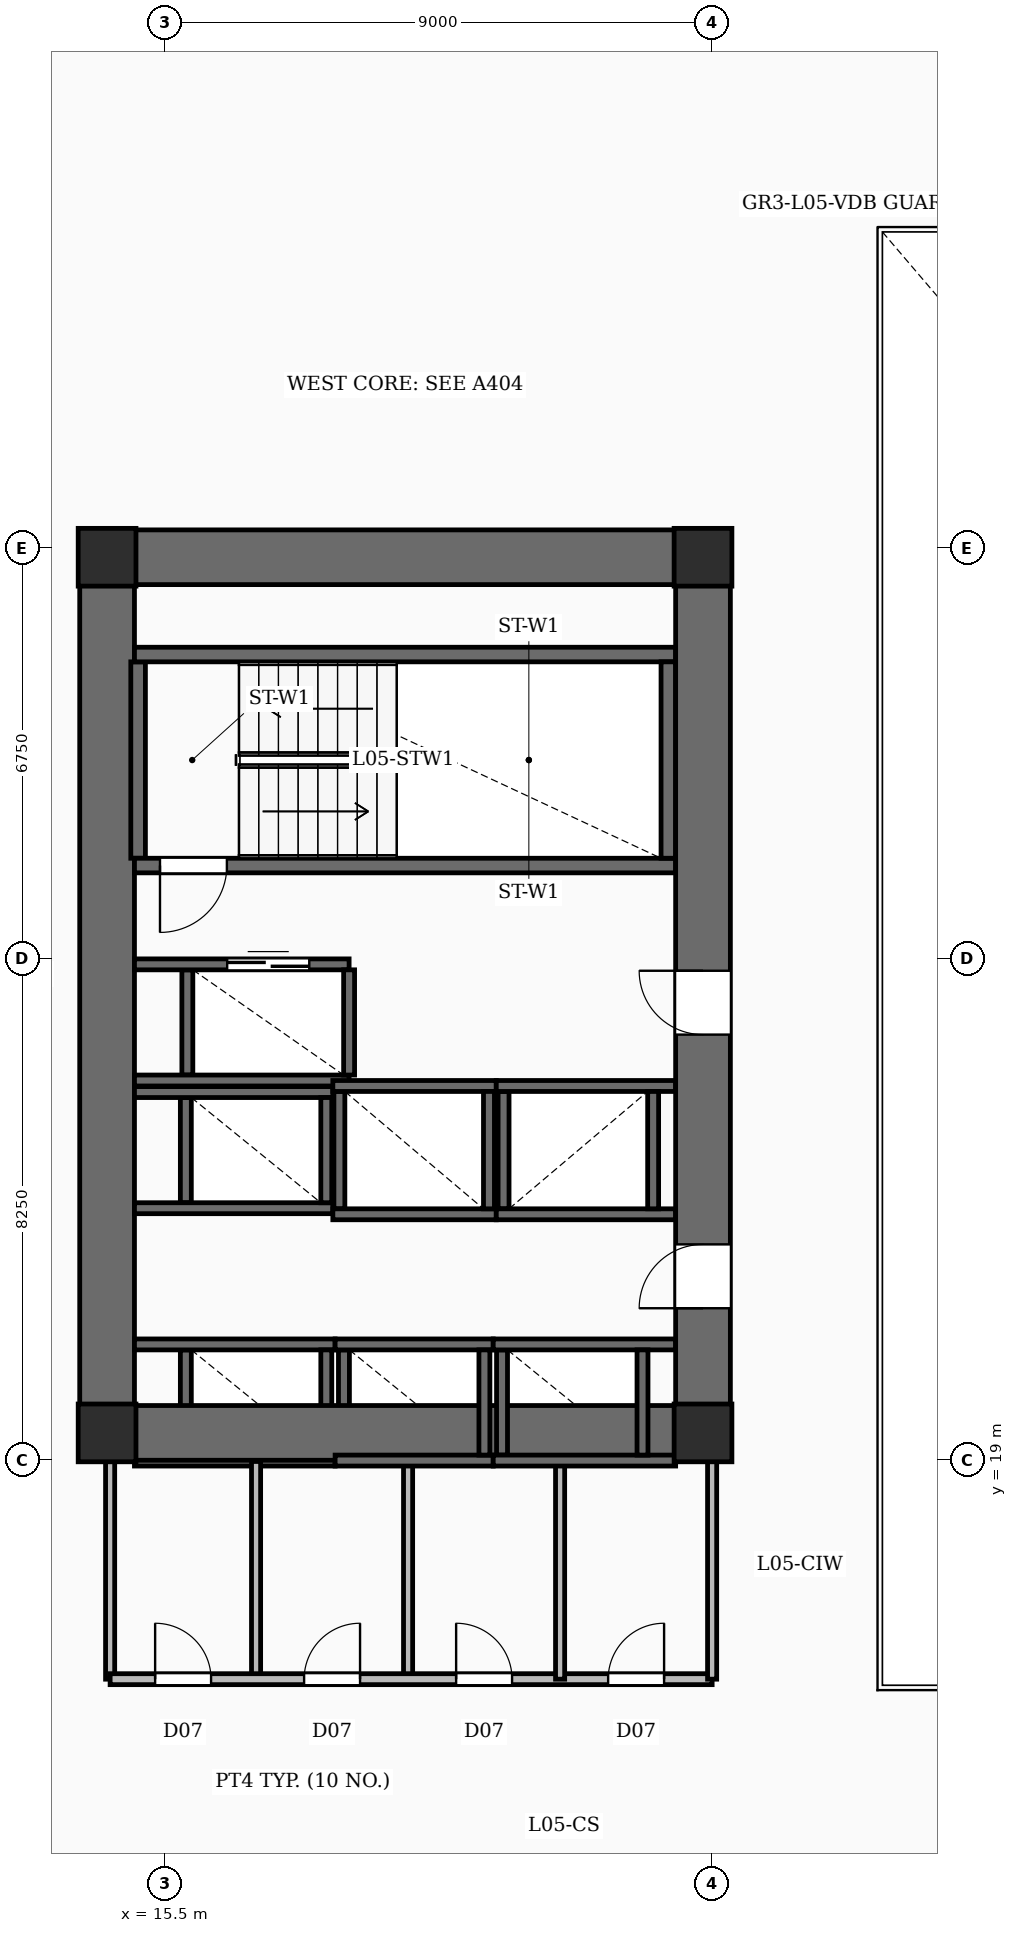
"""IFC4 building model, lengths in metres.
Left out: names, types, materials, properties, quantities, classifications, styles, units other than length and angle.
Written with IfcOpenShell. Run it as: python <this file> out.ifc"""

import sys

from ifc_helpers import new_model, si_unit, direction, frame, frame_2d, origin, origin_2d, place, context, subcontext, project, spatial, rectangle, extrude, element, fill, save


model = new_model("IFC4")
c1 = context("Model", 3, precision=1e-05, world=origin(), true_north=direction((0.0, 1.0)))
c2 = subcontext(c1, "Body", "Model", "MODEL_VIEW")
j1 = project(units=[si_unit("LENGTHUNIT", "METRE"), si_unit("PLANEANGLEUNIT", "RADIAN")], contexts=[c1])
p1 = place(None, origin())
s1 = spatial("IfcSite", under=j1, at=p1, CompositionType="ELEMENT")
p2 = place(p1, origin())
s2 = spatial("IfcBuilding", under=s1, at=p2, CompositionType="ELEMENT")
p3 = place(p2, frame((0.0, 0.0, 28.0)))
s3 = spatial("IfcBuildingStorey", under=s2, at=p3, CompositionType="ELEMENT", Elevation=28.0)
p4 = place(p3, frame((14.55, 19.0, -0.35), z_axis=(0.0, 0.0, 1.0), x_axis=(0.0, 1.0, 0.0)))
e1 = element("IfcWall", 1, at=p4, inside=s3, PredefinedType="SHEAR", context=c2, shape_type="SweptSolid", body=[
    extrude(rectangle(XDim=15.3, YDim=0.9, at=frame_2d((7.65, 0.0))), origin(), (0.0, 0.0, 1.0), 5.9),
])
p5 = place(p3, frame((24.35, 19.0, -0.35), z_axis=(0.0, 0.0, 1.0), x_axis=(0.0, 1.0, 0.0)))
e2 = element("IfcWall", 2, at=p5, inside=s3, PredefinedType="SHEAR", context=c2, shape_type="SweptSolid", body=[
    extrude(rectangle(XDim=15.3, YDim=0.9, at=frame_2d((7.65, 0.0))), origin(), (0.0, 0.0, 1.0), 5.9),
])
p6 = place(p5, frame((2.5, 0.0, 0.35)))
e3 = element("IfcOpeningElement", 3, at=p6, cuts=e2, PredefinedType="OPENING", context=c2, shape_type="SweptSolid", body=[
    extrude(rectangle(XDim=1.05, YDim=2.15, at=frame_2d((0.525, 1.075))), frame((0.0, 0.46, 0.0), z_axis=(0.0, -1.0, 0.0), x_axis=(1.0, 0.0, 0.0)), (0.0, 0.0, 1.0), 0.92),
])
p7 = place(p5, frame((7.0, 0.0, 0.35)))
e4 = element("IfcOpeningElement", 4, at=p7, cuts=e2, PredefinedType="OPENING", context=c2, shape_type="SweptSolid", body=[
    extrude(rectangle(XDim=1.05, YDim=2.15, at=frame_2d((0.525, 1.075))), frame((0.0, 0.46, 0.0), z_axis=(0.0, -1.0, 0.0), x_axis=(1.0, 0.0, 0.0)), (0.0, 0.0, 1.0), 0.92),
])
for number, where, z_axis, x_axis in (
    (5, (15.0, 19.45, -0.35), (0.0, 0.0, 1.0), (1.0, 0.0, 0.0)),
    (6, (15.0, 33.85, -0.35), (0.0, 0.0, 1.0), (1.0, 0.0, 0.0)),
):
    element("IfcWall", number, at=place(p3, frame(where, z_axis=z_axis, x_axis=x_axis)), inside=s3, PredefinedType="SHEAR", context=c2, shape_type="SweptSolid", body=[
        extrude(rectangle(XDim=8.9, YDim=0.9, at=frame_2d((4.45, 0.0))), origin(), (0.0, 0.0, 1.0), 5.9),
    ])
for number, where, z_axis, x_axis in (
    (7, (14.55, 19.45, -0.35), (0.0, 0.0, 1.0), (1.0, 0.0, 0.0)),
    (8, (24.35, 19.45, -0.35), (0.0, 0.0, 1.0), (1.0, 0.0, 0.0)),
    (9, (14.55, 33.85, -0.35), (0.0, 0.0, 1.0), (1.0, 0.0, 0.0)),
    (10, (24.35, 33.85, -0.35), (0.0, 0.0, 1.0), (1.0, 0.0, 0.0)),
):
    element("IfcColumn", number, at=place(p3, frame(where, z_axis=z_axis, x_axis=x_axis)), inside=s3, PredefinedType="COLUMN", context=c2, shape_type="SweptSolid", body=[
        extrude(rectangle(XDim=0.95, YDim=0.95, at=origin_2d()), origin(), (0.0, 0.0, 1.0), 5.9),
    ])
p8 = place(p3, frame((23.9, 28.78, 0.0), z_axis=(0.0, 0.0, 1.0), x_axis=(-1.0, 0.0, 0.0)))
e11 = element("IfcWall", 11, at=p8, inside=s3, PredefinedType="SOLIDWALL", context=c2, shape_type="SweptSolid", body=[
    extrude(rectangle(XDim=8.9, YDim=0.24, at=frame_2d((4.45, 0.0))), origin(), (0.0, 0.0, 1.0), 5.55),
])
p9 = place(p8, frame((7.38, 0.0, 0.0)))
e12 = element("IfcOpeningElement", 12, at=p9, cuts=e11, PredefinedType="OPENING", context=c2, shape_type="SweptSolid", body=[
    extrude(rectangle(XDim=1.1, YDim=2.15, at=frame_2d((0.55, 1.075))), frame((0.0, 0.13, 0.0), z_axis=(0.0, -1.0, 0.0), x_axis=(1.0, 0.0, 0.0)), (0.0, 0.0, 1.0), 0.26),
])
p10 = place(p3, frame((15.0, 32.25, 0.0), z_axis=(0.0, 0.0, 1.0), x_axis=(1.0, 0.0, 0.0)))
e13 = element("IfcWall", 13, at=p10, inside=s3, PredefinedType="SOLIDWALL", context=c2, shape_type="SweptSolid", body=[
    extrude(rectangle(XDim=8.9, YDim=0.24, at=frame_2d((4.45, 0.0))), origin(), (0.0, 0.0, 1.0), 5.55),
])
for number, where, z_axis, x_axis in (
    (14, (15.06, 28.9, 0.0), (0.0, 0.0, 1.0), (0.0, 1.0, 0.0)),
    (15, (23.78, 28.9, 0.0), (0.0, 0.0, 1.0), (0.0, 1.0, 0.0)),
):
    element("IfcWall", number, at=place(p3, frame(where, z_axis=z_axis, x_axis=x_axis)), inside=s3, PredefinedType="SOLIDWALL", context=c2, shape_type="SweptSolid", body=[
        extrude(rectangle(XDim=3.23, YDim=0.24, at=frame_2d((1.615, 0.0))), origin(), (0.0, 0.0, 1.0), 5.55),
    ])
for number, where, z_axis, x_axis in (
    (16, (15.0, 20.905, 0.0), (0.0, 0.0, 1.0), (1.0, 0.0, 0.0)),
    (17, (15.0, 18.995, 0.0), (0.0, 0.0, 1.0), (1.0, 0.0, 0.0)),
):
    element("IfcWall", number, at=place(p3, frame(where, z_axis=z_axis, x_axis=x_axis)), inside=s3, PredefinedType="SOLIDWALL", context=c2, shape_type="SweptSolid", body=[
        extrude(rectangle(XDim=3.3, YDim=0.18, at=frame_2d((1.65, 0.0))), origin(), (0.0, 0.0, 1.0), 5.55),
    ])
for number, where, z_axis, x_axis in (
    (18, (15.845, 19.085, 0.0), (0.0, 0.0, 1.0), (0.0, 1.0, 0.0)),
    (19, (18.155, 19.085, 0.0), (0.0, 0.0, 1.0), (0.0, 1.0, 0.0)),
):
    element("IfcWall", number, at=place(p3, frame(where, z_axis=z_axis, x_axis=x_axis)), inside=s3, PredefinedType="SOLIDWALL", context=c2, shape_type="SweptSolid", body=[
        extrude(rectangle(XDim=1.73, YDim=0.18, at=frame_2d((0.865, 0.0))), origin(), (0.0, 0.0, 1.0), 5.55),
    ])
for number, where, z_axis, x_axis in (
    (20, (18.3, 20.905, 0.0), (0.0, 0.0, 1.0), (1.0, 0.0, 0.0)),
    (21, (18.3, 18.995, 0.0), (0.0, 0.0, 1.0), (1.0, 0.0, 0.0)),
):
    element("IfcWall", number, at=place(p3, frame(where, z_axis=z_axis, x_axis=x_axis)), inside=s3, PredefinedType="SOLIDWALL", context=c2, shape_type="SweptSolid", body=[
        extrude(rectangle(XDim=2.6, YDim=0.18, at=frame_2d((1.3, 0.0))), origin(), (0.0, 0.0, 1.0), 5.55),
    ])
for number, where, z_axis, x_axis in (
    (22, (18.445, 19.085, 0.0), (0.0, 0.0, 1.0), (0.0, 1.0, 0.0)),
    (23, (20.755, 19.085, 0.0), (0.0, 0.0, 1.0), (0.0, 1.0, 0.0)),
):
    element("IfcWall", number, at=place(p3, frame(where, z_axis=z_axis, x_axis=x_axis)), inside=s3, PredefinedType="SOLIDWALL", context=c2, shape_type="SweptSolid", body=[
        extrude(rectangle(XDim=1.73, YDim=0.18, at=frame_2d((0.865, 0.0))), origin(), (0.0, 0.0, 1.0), 5.55),
    ])
for number, where, z_axis, x_axis in (
    (24, (20.9, 20.905, 0.0), (0.0, 0.0, 1.0), (1.0, 0.0, 0.0)),
    (25, (20.9, 18.995, 0.0), (0.0, 0.0, 1.0), (1.0, 0.0, 0.0)),
):
    element("IfcWall", number, at=place(p3, frame(where, z_axis=z_axis, x_axis=x_axis)), inside=s3, PredefinedType="SOLIDWALL", context=c2, shape_type="SweptSolid", body=[
        extrude(rectangle(XDim=3.0, YDim=0.18, at=frame_2d((1.5, 0.0))), origin(), (0.0, 0.0, 1.0), 5.55),
    ])
for number, where, z_axis, x_axis in (
    (26, (21.045, 19.085, 0.0), (0.0, 0.0, 1.0), (0.0, 1.0, 0.0)),
    (27, (23.355, 19.085, 0.0), (0.0, 0.0, 1.0), (0.0, 1.0, 0.0)),
):
    element("IfcWall", number, at=place(p3, frame(where, z_axis=z_axis, x_axis=x_axis)), inside=s3, PredefinedType="SOLIDWALL", context=c2, shape_type="SweptSolid", body=[
        extrude(rectangle(XDim=1.73, YDim=0.18, at=frame_2d((0.865, 0.0))), origin(), (0.0, 0.0, 1.0), 5.55),
    ])
for number, where, z_axis, x_axis in (
    (28, (15.0, 25.055, 0.0), (0.0, 0.0, 1.0), (1.0, 0.0, 0.0)),
    (29, (15.0, 23.145, 0.0), (0.0, 0.0, 1.0), (1.0, 0.0, 0.0)),
):
    element("IfcWall", number, at=place(p3, frame(where, z_axis=z_axis, x_axis=x_axis)), inside=s3, PredefinedType="SOLIDWALL", context=c2, shape_type="SweptSolid", body=[
        extrude(rectangle(XDim=3.262, YDim=0.18, at=frame_2d((1.631, 0.0))), origin(), (0.0, 0.0, 1.0), 5.55),
    ])
for number, where, z_axis, x_axis in (
    (30, (15.845, 23.235, 0.0), (0.0, 0.0, 1.0), (0.0, 1.0, 0.0)),
    (31, (18.155, 23.235, 0.0), (0.0, 0.0, 1.0), (0.0, 1.0, 0.0)),
):
    element("IfcWall", number, at=place(p3, frame(where, z_axis=z_axis, x_axis=x_axis)), inside=s3, PredefinedType="SOLIDWALL", context=c2, shape_type="SweptSolid", body=[
        extrude(rectangle(XDim=1.73, YDim=0.18, at=frame_2d((0.865, 0.0))), origin(), (0.0, 0.0, 1.0), 5.55),
    ])
for number, where, z_axis, x_axis in (
    (32, (18.262, 25.155, 0.0), (0.0, 0.0, 1.0), (1.0, 0.0, 0.0)),
    (33, (18.262, 23.045, 0.0), (0.0, 0.0, 1.0), (1.0, 0.0, 0.0)),
):
    element("IfcWall", number, at=place(p3, frame(where, z_axis=z_axis, x_axis=x_axis)), inside=s3, PredefinedType="SOLIDWALL", context=c2, shape_type="SweptSolid", body=[
        extrude(rectangle(XDim=2.688, YDim=0.18, at=frame_2d((1.344, 0.0))), origin(), (0.0, 0.0, 1.0), 5.55),
    ])
for number, where, z_axis, x_axis in (
    (34, (18.37, 23.135, 0.0), (0.0, 0.0, 1.0), (0.0, 1.0, 0.0)),
    (35, (20.83, 23.135, 0.0), (0.0, 0.0, 1.0), (0.0, 1.0, 0.0)),
):
    element("IfcWall", number, at=place(p3, frame(where, z_axis=z_axis, x_axis=x_axis)), inside=s3, PredefinedType="SOLIDWALL", context=c2, shape_type="SweptSolid", body=[
        extrude(rectangle(XDim=1.93, YDim=0.18, at=frame_2d((0.965, 0.0))), origin(), (0.0, 0.0, 1.0), 5.55),
    ])
for number, where, z_axis, x_axis in (
    (36, (20.95, 25.155, 0.0), (0.0, 0.0, 1.0), (1.0, 0.0, 0.0)),
    (37, (20.95, 23.045, 0.0), (0.0, 0.0, 1.0), (1.0, 0.0, 0.0)),
):
    element("IfcWall", number, at=place(p3, frame(where, z_axis=z_axis, x_axis=x_axis)), inside=s3, PredefinedType="SOLIDWALL", context=c2, shape_type="SweptSolid", body=[
        extrude(rectangle(XDim=2.95, YDim=0.18, at=frame_2d((1.475, 0.0))), origin(), (0.0, 0.0, 1.0), 5.55),
    ])
for number, where, z_axis, x_axis in (
    (38, (21.07, 23.135, 0.0), (0.0, 0.0, 1.0), (0.0, 1.0, 0.0)),
    (39, (23.53, 23.135, 0.0), (0.0, 0.0, 1.0), (0.0, 1.0, 0.0)),
):
    element("IfcWall", number, at=place(p3, frame(where, z_axis=z_axis, x_axis=x_axis)), inside=s3, PredefinedType="SOLIDWALL", context=c2, shape_type="SweptSolid", body=[
        extrude(rectangle(XDim=1.93, YDim=0.18, at=frame_2d((0.965, 0.0))), origin(), (0.0, 0.0, 1.0), 5.55),
    ])
p11 = place(p3, frame((15.0, 27.155, 0.0), z_axis=(0.0, 0.0, 1.0), x_axis=(1.0, 0.0, 0.0)))
e40 = element("IfcWall", 40, at=p11, inside=s3, PredefinedType="SOLIDWALL", context=c2, shape_type="SweptSolid", body=[
    extrude(rectangle(XDim=3.53, YDim=0.18, at=frame_2d((1.765, 0.0))), origin(), (0.0, 0.0, 1.0), 5.55),
])
p12 = place(p11, frame((1.525, 0.0, 0.0)))
e41 = element("IfcOpeningElement", 41, at=p12, cuts=e40, PredefinedType="OPENING", context=c2, shape_type="SweptSolid", body=[
    extrude(rectangle(XDim=1.35, YDim=2.3, at=frame_2d((0.675, 1.15))), frame((0.0, 0.1, 0.0), z_axis=(0.0, -1.0, 0.0), x_axis=(1.0, 0.0, 0.0)), (0.0, 0.0, 1.0), 0.2),
])
p13 = place(p3, frame((15.0, 25.245, 0.0), z_axis=(0.0, 0.0, 1.0), x_axis=(1.0, 0.0, 0.0)))
e42 = element("IfcWall", 42, at=p13, inside=s3, PredefinedType="SOLIDWALL", context=c2, shape_type="SweptSolid", body=[
    extrude(rectangle(XDim=3.53, YDim=0.18, at=frame_2d((1.765, 0.0))), origin(), (0.0, 0.0, 1.0), 5.55),
])
for number, where, z_axis, x_axis in (
    (43, (15.87, 25.335, 0.0), (0.0, 0.0, 1.0), (0.0, 1.0, 0.0)),
    (44, (18.53, 25.335, 0.0), (0.0, 0.0, 1.0), (0.0, 1.0, 0.0)),
):
    element("IfcWall", number, at=place(p3, frame(where, z_axis=z_axis, x_axis=x_axis)), inside=s3, PredefinedType="SOLIDWALL", context=c2, shape_type="SweptSolid", body=[
        extrude(rectangle(XDim=1.73, YDim=0.18, at=frame_2d((0.865, 0.0))), origin(), (0.0, 0.0, 1.0), 5.55),
    ])
for number, where, z_axis, x_axis in (
    (45, (17.0, 15.4, 0.0), (0.0, 0.0, 1.0), (0.0, 1.0, 0.0)),
    (46, (19.5, 15.4, 0.0), (0.0, 0.0, 1.0), (0.0, 1.0, 0.0)),
    (47, (22.0, 15.4, 0.0), (0.0, 0.0, 1.0), (0.0, 1.0, 0.0)),
):
    element("IfcWall", number, at=place(p3, frame(where, z_axis=z_axis, x_axis=x_axis)), inside=s3, PredefinedType="PARTITIONING", context=c2, shape_type="SweptSolid", body=[
        extrude(rectangle(XDim=3.58, YDim=0.15, at=frame_2d((1.79, 0.0))), origin(), (0.0, 0.0, 1.0), 4.61),
    ])
p14 = place(p3, frame((14.6, 15.4, 0.0), z_axis=(0.0, 0.0, 1.0), x_axis=(1.0, 0.0, 0.0)))
e48 = element("IfcWall", 48, at=p14, inside=s3, PredefinedType="PARTITIONING", context=c2, shape_type="SweptSolid", body=[
    extrude(rectangle(XDim=9.9, YDim=0.18, at=frame_2d((4.95, 0.0))), origin(), (0.0, 0.0, 1.0), 4.61),
])
p15 = place(p14, frame((0.74, 0.0, 0.0)))
e49 = element("IfcOpeningElement", 49, at=p15, cuts=e48, PredefinedType="OPENING", context=c2, shape_type="SweptSolid", body=[
    extrude(rectangle(XDim=0.92, YDim=2.1, at=frame_2d((0.46, 1.05))), frame((0.0, 0.1, 0.0), z_axis=(0.0, -1.0, 0.0), x_axis=(1.0, 0.0, 0.0)), (0.0, 0.0, 1.0), 0.2),
])
p16 = place(p14, frame((3.19, 0.0, 0.0)))
e50 = element("IfcOpeningElement", 50, at=p16, cuts=e48, PredefinedType="OPENING", context=c2, shape_type="SweptSolid", body=[
    extrude(rectangle(XDim=0.92, YDim=2.1, at=frame_2d((0.46, 1.05))), frame((0.0, 0.1, 0.0), z_axis=(0.0, -1.0, 0.0), x_axis=(1.0, 0.0, 0.0)), (0.0, 0.0, 1.0), 0.2),
])
p17 = place(p14, frame((5.69, 0.0, 0.0)))
e51 = element("IfcOpeningElement", 51, at=p17, cuts=e48, PredefinedType="OPENING", context=c2, shape_type="SweptSolid", body=[
    extrude(rectangle(XDim=0.92, YDim=2.1, at=frame_2d((0.46, 1.05))), frame((0.0, 0.1, 0.0), z_axis=(0.0, -1.0, 0.0), x_axis=(1.0, 0.0, 0.0)), (0.0, 0.0, 1.0), 0.2),
])
p18 = place(p14, frame((8.19, 0.0, 0.0)))
e52 = element("IfcOpeningElement", 52, at=p18, cuts=e48, PredefinedType="OPENING", context=c2, shape_type="SweptSolid", body=[
    extrude(rectangle(XDim=0.92, YDim=2.1, at=frame_2d((0.46, 1.05))), frame((0.0, 0.1, 0.0), z_axis=(0.0, -1.0, 0.0), x_axis=(1.0, 0.0, 0.0)), (0.0, 0.0, 1.0), 0.2),
])
p19 = place(p3, frame((14.6, 15.4, 0.0), z_axis=(0.0, 0.0, 1.0), x_axis=(0.0, 1.0, 0.0)))
e53 = element("IfcWall", 53, at=p19, inside=s3, PredefinedType="PARTITIONING", context=c2, shape_type="SweptSolid", body=[
    extrude(rectangle(XDim=3.58, YDim=0.15, at=frame_2d((1.79, 0.0))), origin(), (0.0, 0.0, 1.0), 3.6),
])
p20 = place(p3, frame((24.5, 15.4, 0.0), z_axis=(0.0, 0.0, 1.0), x_axis=(0.0, 1.0, 0.0)))
e54 = element("IfcWall", 54, at=p20, inside=s3, PredefinedType="PARTITIONING", context=c2, shape_type="SweptSolid", body=[
    extrude(rectangle(XDim=3.58, YDim=0.15, at=frame_2d((1.79, 0.0))), origin(), (0.0, 0.0, 1.0), 4.61),
])
p21 = place(p6, origin())
e55 = element("IfcDoor", 55, at=p21, inside=s3, OperationType="SINGLE_SWING_LEFT", PredefinedType="DOOR", context=c2, shape_type="SweptSolid", body=[
    extrude(rectangle(XDim=1.05, YDim=2.15, at=frame_2d((0.525, 1.075))), frame((0.0, 0.025, 0.0), z_axis=(0.0, -1.0, 0.0), x_axis=(1.0, 0.0, 0.0)), (0.0, 0.0, 1.0), 0.05),
])
fill(e3, e55)
p22 = place(p7, origin())
e56 = element("IfcDoor", 56, at=p22, inside=s3, OperationType="SINGLE_SWING_RIGHT", PredefinedType="DOOR", context=c2, shape_type="SweptSolid", body=[
    extrude(rectangle(XDim=1.05, YDim=2.15, at=frame_2d((0.525, 1.075))), frame((0.0, 0.025, 0.0), z_axis=(0.0, -1.0, 0.0), x_axis=(1.0, 0.0, 0.0)), (0.0, 0.0, 1.0), 0.05),
])
fill(e4, e56)
p23 = place(p9, origin())
e57 = element("IfcDoor", 57, at=p23, inside=s3, OperationType="SINGLE_SWING_RIGHT", PredefinedType="DOOR", context=c2, shape_type="SweptSolid", body=[
    extrude(rectangle(XDim=1.1, YDim=2.15, at=frame_2d((0.55, 1.075))), frame((0.0, 0.025, 0.0), z_axis=(0.0, -1.0, 0.0), x_axis=(1.0, 0.0, 0.0)), (0.0, 0.0, 1.0), 0.05),
])
fill(e12, e57)
p24 = place(p12, origin())
e58 = element("IfcDoor", 58, at=p24, inside=s3, OperationType="DOUBLE_DOOR_SLIDING", PredefinedType="DOOR", context=c2, shape_type="SweptSolid", body=[
    extrude(rectangle(XDim=1.35, YDim=2.3, at=frame_2d((0.675, 1.15))), frame((0.0, 0.025, 0.0), z_axis=(0.0, -1.0, 0.0), x_axis=(1.0, 0.0, 0.0)), (0.0, 0.0, 1.0), 0.05),
])
fill(e41, e58)
p25 = place(p15, origin())
e59 = element("IfcDoor", 59, at=p25, inside=s3, OperationType="SINGLE_SWING_LEFT", PredefinedType="DOOR", context=c2, shape_type="SweptSolid", body=[
    extrude(rectangle(XDim=0.92, YDim=2.1, at=frame_2d((0.46, 1.05))), frame((0.0, 0.025, 0.0), z_axis=(0.0, -1.0, 0.0), x_axis=(1.0, 0.0, 0.0)), (0.0, 0.0, 1.0), 0.05),
])
fill(e49, e59)
p26 = place(p16, origin())
e60 = element("IfcDoor", 60, at=p26, inside=s3, OperationType="SINGLE_SWING_RIGHT", PredefinedType="DOOR", context=c2, shape_type="SweptSolid", body=[
    extrude(rectangle(XDim=0.92, YDim=2.1, at=frame_2d((0.46, 1.05))), frame((0.0, 0.025, 0.0), z_axis=(0.0, -1.0, 0.0), x_axis=(1.0, 0.0, 0.0)), (0.0, 0.0, 1.0), 0.05),
])
fill(e50, e60)
p27 = place(p17, origin())
e61 = element("IfcDoor", 61, at=p27, inside=s3, OperationType="SINGLE_SWING_LEFT", PredefinedType="DOOR", context=c2, shape_type="SweptSolid", body=[
    extrude(rectangle(XDim=0.92, YDim=2.1, at=frame_2d((0.46, 1.05))), frame((0.0, 0.025, 0.0), z_axis=(0.0, -1.0, 0.0), x_axis=(1.0, 0.0, 0.0)), (0.0, 0.0, 1.0), 0.05),
])
fill(e51, e61)
p28 = place(p18, origin())
e62 = element("IfcDoor", 62, at=p28, inside=s3, OperationType="SINGLE_SWING_RIGHT", PredefinedType="DOOR", context=c2, shape_type="SweptSolid", body=[
    extrude(rectangle(XDim=0.92, YDim=2.1, at=frame_2d((0.46, 1.05))), frame((0.0, 0.025, 0.0), z_axis=(0.0, -1.0, 0.0), x_axis=(1.0, 0.0, 0.0)), (0.0, 0.0, 1.0), 0.05),
])
fill(e52, e62)
save(model, sys.argv[1])
